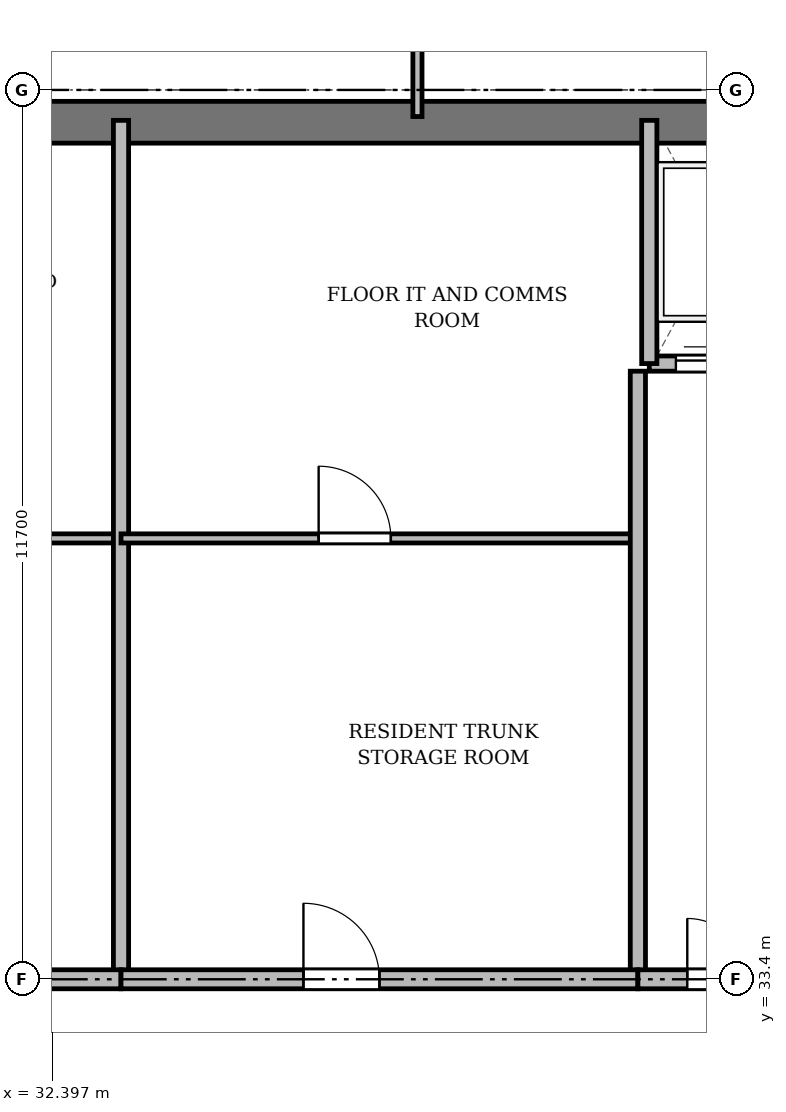
"""IFC4 building model, lengths in metres.
Left out: names, types, materials, properties, quantities, classifications, styles, units other than length and angle.
Written with IfcOpenShell. Run it as: python <this file> out.ifc"""

import sys

from ifc_helpers import new_model, si_unit, direction, frame, frame_2d, origin, place, context, subcontext, project, spatial, rectangle, extrude, source, transform, mapped, element, fill, save


model = new_model("IFC4")
c1 = context("Model", 3, precision=1e-05, world=origin(), true_north=direction((0.0, 1.0)))
c2 = subcontext(c1, "Body", "Model", "MODEL_VIEW")
j1 = project(units=[si_unit("LENGTHUNIT", "METRE"), si_unit("PLANEANGLEUNIT", "RADIAN")], contexts=[c1])
p1 = place(None, origin())
s1 = spatial("IfcSite", under=j1, at=p1, CompositionType="ELEMENT")
p2 = place(p1, origin())
s2 = spatial("IfcBuilding", under=s1, at=p2, CompositionType="ELEMENT")
p3 = place(p2, frame((0.0, 0.0, 252.3)))
s3 = spatial("IfcBuildingStorey", under=s2, at=p3, CompositionType="ELEMENT", Elevation=252.3)
p4 = place(p3, frame((15.65, 44.675, 0.0), z_axis=(0.0, 0.0, 1.0), x_axis=(1.0, 0.0, 0.0)))
e1 = element("IfcWall", 1, at=p4, inside=s3, PredefinedType="SHEAR", context=c2, shape_type="SweptSolid", body=[
    extrude(rectangle(XDim=43.1, YDim=0.55, at=frame_2d((21.55, 0.0))), origin(), (0.0, 0.0, 1.0), 3.37),
])
p5 = place(p3, frame((26.3, 39.2, 0.0), z_axis=(0.0, 0.0, 1.0), x_axis=(1.0, 0.0, 0.0)))
e2 = element("IfcWall", 2, at=p5, inside=s3, PredefinedType="PARTITIONING", context=c2, shape_type="SweptSolid", body=[
    extrude(rectangle(XDim=7.0, YDim=0.12, at=frame_2d((3.5, 0.0))), origin(), (0.0, 0.0, 1.0), 2.87),
])
p6 = place(p5, frame((2.6, 0.0, 0.0)))
e3 = element("IfcOpeningElement", 3, at=p6, cuts=e2, PredefinedType="OPENING", context=c2, shape_type="SweptSolid", body=[
    extrude(rectangle(XDim=0.95, YDim=2.15, at=frame_2d((0.475, 1.075))), frame((0.0, 0.07, 0.0), z_axis=(0.0, -1.0, 0.0), x_axis=(1.0, 0.0, 0.0)), (0.0, 0.0, 1.0), 0.14),
])
p7 = place(p3, frame((33.3, 33.4, 0.0), z_axis=(0.0, 0.0, 1.0), x_axis=(0.0, 1.0, 0.0)))
e4 = element("IfcWall", 4, at=p7, inside=s3, PredefinedType="SOLIDWALL", context=c2, shape_type="SweptSolid", body=[
    extrude(rectangle(XDim=11.3, YDim=0.2, at=frame_2d((5.65, 0.0))), origin(), (0.0, 0.0, 1.0), 2.92),
])
p8 = place(p3, frame((33.3, 39.2, 0.0), z_axis=(0.0, 0.0, 1.0), x_axis=(1.0, 0.0, 0.0)))
e5 = element("IfcWall", 5, at=p8, inside=s3, PredefinedType="PARTITIONING", context=c2, shape_type="SweptSolid", body=[
    extrude(rectangle(XDim=6.8, YDim=0.12, at=frame_2d((3.4, 0.0))), origin(), (0.0, 0.0, 1.0), 3.37),
])
p9 = place(p8, frame((2.6, 0.0, 0.0)))
e6 = element("IfcOpeningElement", 6, at=p9, cuts=e5, PredefinedType="OPENING", context=c2, shape_type="SweptSolid", body=[
    extrude(rectangle(XDim=0.95, YDim=2.15, at=frame_2d((0.475, 1.075))), frame((0.0, 0.07, 0.0), z_axis=(0.0, -1.0, 0.0), x_axis=(1.0, 0.0, 0.0)), (0.0, 0.0, 1.0), 0.14),
])
p10 = place(p3, frame((40.1, 33.4, 0.0), z_axis=(0.0, 0.0, 1.0), x_axis=(0.0, 1.0, 0.0)))
e7 = element("IfcWall", 7, at=p10, inside=s3, PredefinedType="SOLIDWALL", context=c2, shape_type="SweptSolid", body=[
    extrude(rectangle(XDim=8.0, YDim=0.2, at=frame_2d((4.0, 0.0))), origin(), (0.0, 0.0, 1.0), 2.92),
])
p11 = place(p3, frame((40.25, 41.5, 0.0), z_axis=(0.0, 0.0, 1.0), x_axis=(1.0, 0.0, 0.0)))
e8 = element("IfcWall", 8, at=p11, inside=s3, PredefinedType="SOLIDWALL", context=c2, shape_type="SweptSolid", body=[
    extrude(rectangle(XDim=6.9, YDim=0.2, at=frame_2d((3.45, 0.0))), origin(), (0.0, 0.0, 1.0), 3.37),
])
p12 = place(p11, frame((0.35, 0.0, 0.0)))
e9 = element("IfcOpeningElement", 9, at=p12, cuts=e8, PredefinedType="OPENING", context=c2, shape_type="SweptSolid", body=[
    extrude(rectangle(XDim=1.05, YDim=2.15, at=frame_2d((0.525, 1.075))), frame((0.0, 0.11, 0.0), z_axis=(0.0, -1.0, 0.0), x_axis=(1.0, 0.0, 0.0)), (0.0, 0.0, 1.0), 0.22),
])
p13 = place(p11, frame((2.05, 0.0, 0.0)))
e10 = element("IfcOpeningElement", 10, at=p13, cuts=e8, PredefinedType="OPENING", context=c2, shape_type="SweptSolid", body=[
    extrude(rectangle(XDim=1.05, YDim=2.15, at=frame_2d((0.525, 1.075))), frame((0.0, 0.11, 0.0), z_axis=(0.0, -1.0, 0.0), x_axis=(1.0, 0.0, 0.0)), (0.0, 0.0, 1.0), 0.22),
])
p14 = place(p11, frame((3.75, 0.0, 0.0)))
e11 = element("IfcOpeningElement", 11, at=p14, cuts=e8, PredefinedType="OPENING", context=c2, shape_type="SweptSolid", body=[
    extrude(rectangle(XDim=1.05, YDim=2.15, at=frame_2d((0.525, 1.075))), frame((0.0, 0.11, 0.0), z_axis=(0.0, -1.0, 0.0), x_axis=(1.0, 0.0, 0.0)), (0.0, 0.0, 1.0), 0.22),
])
p15 = place(p11, frame((5.45, 0.0, 0.0)))
e12 = element("IfcOpeningElement", 12, at=p15, cuts=e8, PredefinedType="OPENING", context=c2, shape_type="SweptSolid", body=[
    extrude(rectangle(XDim=1.05, YDim=2.15, at=frame_2d((0.525, 1.075))), frame((0.0, 0.11, 0.0), z_axis=(0.0, -1.0, 0.0), x_axis=(1.0, 0.0, 0.0)), (0.0, 0.0, 1.0), 0.22),
])
p16 = place(p3, frame((40.25, 41.5, 0.0), z_axis=(0.0, 0.0, 1.0), x_axis=(0.0, 1.0, 0.0)))
e13 = element("IfcWall", 13, at=p16, inside=s3, PredefinedType="SOLIDWALL", context=c2, shape_type="SweptSolid", body=[
    extrude(rectangle(XDim=3.2, YDim=0.2, at=frame_2d((1.6, 0.0))), origin(), (0.0, 0.0, 1.0), 3.37),
])
p17 = place(p3, frame((26.3, 33.4, 0.0), z_axis=(0.0, 0.0, 1.0), x_axis=(1.0, 0.0, 0.0)))
e14 = element("IfcWall", 14, at=p17, inside=s3, PredefinedType="PARTITIONING", context=c2, shape_type="SweptSolid", body=[
    extrude(rectangle(XDim=7.0, YDim=0.25, at=frame_2d((3.5, 0.0))), origin(), (0.0, 0.0, 1.0), 2.92),
])
p18 = place(p17, frame((1.35, 0.0, 0.0)))
e15 = element("IfcOpeningElement", 15, at=p18, cuts=e14, PredefinedType="OPENING", context=c2, shape_type="SweptSolid", body=[
    extrude(rectangle(XDim=0.95, YDim=2.15, at=frame_2d((0.475, 1.075))), frame((0.0, 0.135, 0.0), z_axis=(0.0, -1.0, 0.0), x_axis=(1.0, 0.0, 0.0)), (0.0, 0.0, 1.0), 0.27),
])
p19 = place(p3, frame((33.3, 33.4, 0.0), z_axis=(0.0, 0.0, 1.0), x_axis=(1.0, 0.0, 0.0)))
e16 = element("IfcWall", 16, at=p19, inside=s3, PredefinedType="PARTITIONING", context=c2, shape_type="SweptSolid", body=[
    extrude(rectangle(XDim=6.8, YDim=0.25, at=frame_2d((3.4, 0.0))), origin(), (0.0, 0.0, 1.0), 2.92),
])
p20 = place(p19, frame((2.4, 0.0, 0.0)))
e17 = element("IfcOpeningElement", 17, at=p20, cuts=e16, PredefinedType="OPENING", context=c2, shape_type="SweptSolid", body=[
    extrude(rectangle(XDim=1.0, YDim=2.15, at=frame_2d((0.5, 1.075))), frame((0.0, 0.135, 0.0), z_axis=(0.0, -1.0, 0.0), x_axis=(1.0, 0.0, 0.0)), (0.0, 0.0, 1.0), 0.27),
])
p21 = place(p3, frame((40.1, 33.4, 0.0), z_axis=(0.0, 0.0, 1.0), x_axis=(1.0, 0.0, 0.0)))
e18 = element("IfcWall", 18, at=p21, inside=s3, PredefinedType="PARTITIONING", context=c2, shape_type="SweptSolid", body=[
    extrude(rectangle(XDim=7.05, YDim=0.25, at=frame_2d((3.525, 0.0))), origin(), (0.0, 0.0, 1.0), 2.92),
])
p22 = place(p21, frame((0.65, 0.0, 0.0)))
e19 = element("IfcOpeningElement", 19, at=p22, cuts=e18, PredefinedType="OPENING", context=c2, shape_type="SweptSolid", body=[
    extrude(rectangle(XDim=1.6, YDim=2.2, at=frame_2d((0.8, 1.1))), frame((0.0, 0.135, 0.0), z_axis=(0.0, -1.0, 0.0), x_axis=(1.0, 0.0, 0.0)), (0.0, 0.0, 1.0), 0.27),
])
p23 = place(p3, frame((37.2, 44.75, 0.0), z_axis=(0.0, 0.0, 1.0), x_axis=(0.0, 1.0, 0.0)))
e20 = element("IfcWall", 20, at=p23, inside=s3, PredefinedType="PARTITIONING", context=c2, shape_type="SweptSolid", body=[
    extrude(rectangle(XDim=3.61, YDim=0.12, at=frame_2d((1.805, 0.0))), origin(), (0.0, 0.0, 1.0), 2.92),
])
p24 = place(p23, frame((1.1, 0.0, 0.0)))
e21 = element("IfcOpeningElement", 21, at=p24, cuts=e20, PredefinedType="OPENING", context=c2, shape_type="SweptSolid", body=[
    extrude(rectangle(XDim=0.95, YDim=2.15, at=frame_2d((0.475, 1.075))), frame((0.0, 0.07, 0.0), z_axis=(0.0, -1.0, 0.0), x_axis=(1.0, 0.0, 0.0)), (0.0, 0.0, 1.0), 0.14),
])
m1 = source(origin(), c2, "Body", "SweptSolid", [
    extrude(rectangle(XDim=0.95, YDim=2.15, at=frame_2d((0.475, 1.075))), frame((0.0, 0.025, 0.0), z_axis=(0.0, -1.0, 0.0), x_axis=(1.0, 0.0, 0.0)), (0.0, 0.0, 1.0), 0.05),
])
p25 = place(p9, origin())
e22 = element("IfcDoor", 22, at=p25, inside=s3, OperationType="SINGLE_SWING_LEFT", PredefinedType="DOOR", context=c2, shape_type="MappedRepresentation", body=[
    mapped(m1, transform((0.0, 0.0, 0.0), x_axis=(1.0, 0.0, 0.0), y_axis=(0.0, 1.0, 0.0), z_axis=(0.0, 0.0, 1.0), scale=1.0)),
])
fill(e6, e22)
m2 = source(origin(), c2, "Body", "SweptSolid", [
    extrude(rectangle(XDim=1.05, YDim=2.15, at=frame_2d((0.525, 1.075))), frame((0.0, 0.025, 0.0), z_axis=(0.0, -1.0, 0.0), x_axis=(1.0, 0.0, 0.0)), (0.0, 0.0, 1.0), 0.05),
])
p26 = place(p12, origin())
e23 = element("IfcDoor", 23, at=p26, inside=s3, OperationType="DOUBLE_DOOR_SLIDING", PredefinedType="DOOR", context=c2, shape_type="MappedRepresentation", body=[
    mapped(m2, transform((0.0, 0.0, 0.0), x_axis=(1.0, 0.0, 0.0), y_axis=(0.0, 1.0, 0.0), z_axis=(0.0, 0.0, 1.0), scale=1.0)),
])
fill(e9, e23)
m3 = source(origin(), c2, "Body", "SweptSolid", [
    extrude(rectangle(XDim=1.0, YDim=2.15, at=frame_2d((0.5, 1.075))), frame((0.0, 0.025, 0.0), z_axis=(0.0, -1.0, 0.0), x_axis=(1.0, 0.0, 0.0)), (0.0, 0.0, 1.0), 0.05),
])
p27 = place(p20, origin())
e24 = element("IfcDoor", 24, at=p27, inside=s3, OperationType="SINGLE_SWING_LEFT", PredefinedType="DOOR", context=c2, shape_type="MappedRepresentation", body=[
    mapped(m3, transform((0.0, 0.0, 0.0), x_axis=(1.0, 0.0, 0.0), y_axis=(0.0, 1.0, 0.0), z_axis=(0.0, 0.0, 1.0), scale=1.0)),
])
fill(e17, e24)
m4 = source(origin(), c2, "Body", "SweptSolid", [
    extrude(rectangle(XDim=1.6, YDim=2.2, at=frame_2d((0.8, 1.1))), frame((0.0, 0.025, 0.0), z_axis=(0.0, -1.0, 0.0), x_axis=(1.0, 0.0, 0.0)), (0.0, 0.0, 1.0), 0.05),
])
p28 = place(p22, origin())
e25 = element("IfcDoor", 25, at=p28, inside=s3, OperationType="DOUBLE_DOOR_SINGLE_SWING", PredefinedType="DOOR", context=c2, shape_type="MappedRepresentation", body=[
    mapped(m4, transform((0.0, 0.0, 0.0), x_axis=(1.0, 0.0, 0.0), y_axis=(0.0, 1.0, 0.0), z_axis=(0.0, 0.0, 1.0), scale=1.0)),
])
fill(e19, e25)
save(model, sys.argv[1])
